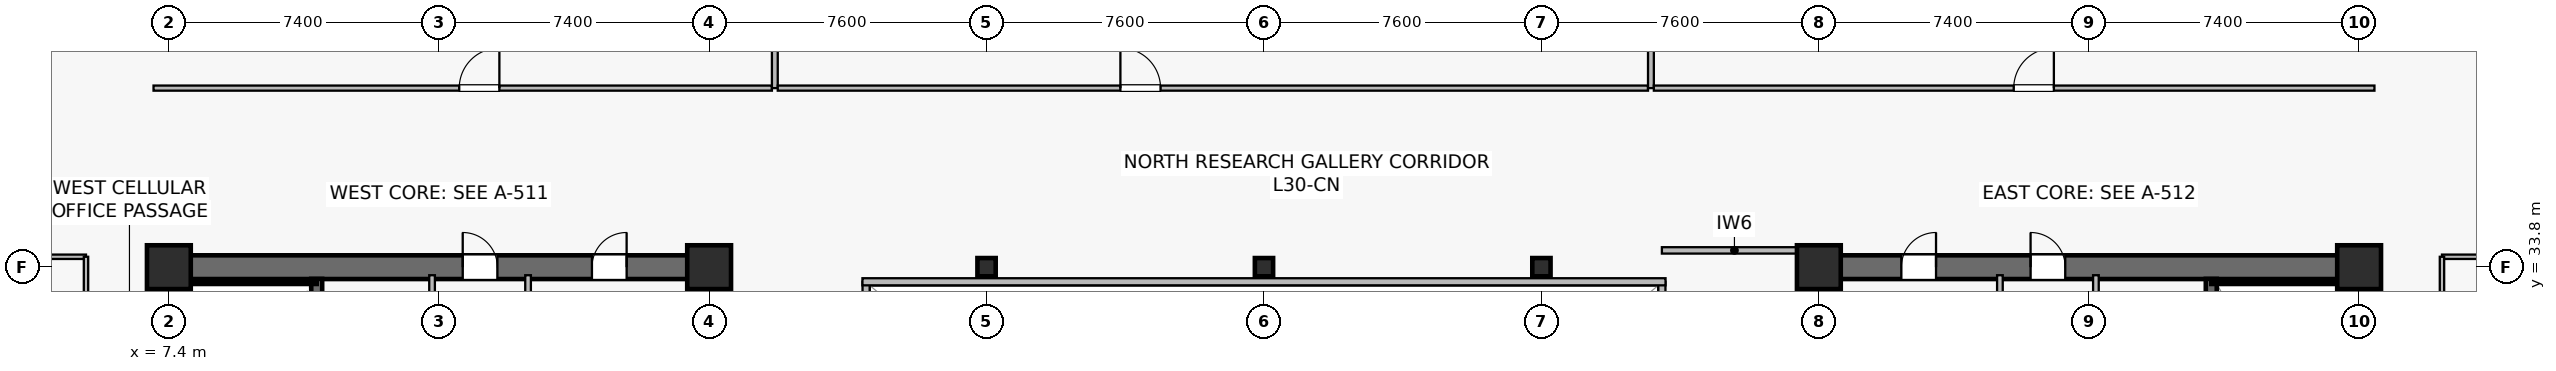
"""IFC4 building model, lengths in metres.
Left out: names, types, materials, properties, quantities, classifications, styles, units other than length and angle.
Written with IfcOpenShell. Run it as: python <this file> out.ifc"""

import sys

from ifc_helpers import new_model, si_unit, direction, frame, frame_2d, origin, origin_2d, place, context, subcontext, project, spatial, rectangle, hollow_rectangle, extrude, source, transform, mapped, element, fill, save


model = new_model("IFC4")
c1 = context("Model", 3, precision=1e-05, world=origin(), true_north=direction((0.0, 1.0)))
c2 = subcontext(c1, "Body", "Model", "MODEL_VIEW")
j1 = project(units=[si_unit("LENGTHUNIT", "METRE"), si_unit("PLANEANGLEUNIT", "RADIAN")], contexts=[c1])
p1 = place(None, origin())
s1 = spatial("IfcSite", under=j1, at=p1, CompositionType="ELEMENT")
p2 = place(p1, origin())
s2 = spatial("IfcBuilding", under=s1, at=p2, CompositionType="ELEMENT")
p3 = place(p2, frame((0.0, 0.0, 125.6)))
s3 = spatial("IfcBuildingStorey", under=s2, at=p3, CompositionType="ELEMENT", Elevation=125.6)
p4 = place(p3, frame((7.075, 33.8, 0.0), z_axis=(0.0, 0.0, 1.0), x_axis=(1.0, 0.0, 0.0)))
e1 = element("IfcWall", 1, at=p4, inside=s3, PredefinedType="SHEAR", context=c2, shape_type="SweptSolid", body=[
    extrude(rectangle(XDim=15.45, YDim=0.65, at=frame_2d((7.725, 0.0))), origin(), (0.0, 0.0, 1.0), 3.79),
])
p5 = place(p4, frame((8.375, 0.0, 0.0)))
e2 = element("IfcOpeningElement", 2, at=p5, cuts=e1, PredefinedType="OPENING", context=c2, shape_type="SweptSolid", body=[
    extrude(rectangle(XDim=0.95, YDim=2.15, at=frame_2d((0.475, 1.075))), frame((0.0, 0.335, 0.0), z_axis=(0.0, -1.0, 0.0), x_axis=(1.0, 0.0, 0.0)), (0.0, 0.0, 1.0), 0.67),
])
p6 = place(p4, frame((11.915, 0.0, 0.0)))
e3 = element("IfcOpeningElement", 3, at=p6, cuts=e1, PredefinedType="OPENING", context=c2, shape_type="SweptSolid", body=[
    extrude(rectangle(XDim=0.95, YDim=2.15, at=frame_2d((0.475, 1.075))), frame((0.0, 0.335, 0.0), z_axis=(0.0, -1.0, 0.0), x_axis=(1.0, 0.0, 0.0)), (0.0, 0.0, 1.0), 0.67),
])
p7 = place(p3, frame((7.4, 15.125, 0.0), z_axis=(0.0, 0.0, 1.0), x_axis=(0.0, 1.0, 0.0)))
e4 = element("IfcWall", 4, at=p7, inside=s3, PredefinedType="SHEAR", context=c2, shape_type="SweptSolid", body=[
    extrude(rectangle(XDim=18.35, YDim=0.65, at=frame_2d((9.175, 0.0))), origin(), (0.0, 0.0, 1.0), 3.79),
])
p8 = place(p3, frame((22.2, 15.125, 0.0), z_axis=(0.0, 0.0, 1.0), x_axis=(0.0, 1.0, 0.0)))
e5 = element("IfcWall", 5, at=p8, inside=s3, PredefinedType="SHEAR", context=c2, shape_type="SweptSolid", body=[
    extrude(rectangle(XDim=18.35, YDim=0.65, at=frame_2d((9.175, 0.0))), origin(), (0.0, 0.0, 1.0), 3.79),
])
p9 = place(p8, frame((3.425, 0.0, 0.0)))
e6 = element("IfcOpeningElement", 6, at=p9, cuts=e5, PredefinedType="OPENING", context=c2, shape_type="SweptSolid", body=[
    extrude(rectangle(XDim=1.42, YDim=2.2, at=frame_2d((0.71, 1.1))), frame((0.0, 0.335, 0.0), z_axis=(0.0, -1.0, 0.0), x_axis=(1.0, 0.0, 0.0)), (0.0, 0.0, 1.0), 0.67),
])
p10 = place(p3, frame((11.45, 24.85, 0.0), z_axis=(0.0, 0.0, 1.0), x_axis=(0.0, 1.0, 0.0)))
e7 = element("IfcWall", 7, at=p10, inside=s3, PredefinedType="SHEAR", context=c2, shape_type="SweptSolid", body=[
    extrude(rectangle(XDim=8.63, YDim=0.3, at=frame_2d((4.315, 0.0))), origin(), (0.0, 0.0, 1.0), 3.79),
])
p11 = place(p10, frame((0.42, 0.0, 0.0)))
e8 = element("IfcOpeningElement", 8, at=p11, cuts=e7, PredefinedType="OPENING", context=c2, shape_type="SweptSolid", body=[
    extrude(rectangle(XDim=1.1, YDim=2.15, at=frame_2d((0.55, 1.075))), frame((0.0, 0.16, 0.0), z_axis=(0.0, -1.0, 0.0), x_axis=(1.0, 0.0, 0.0)), (0.0, 0.0, 1.0), 0.32),
])
p12 = place(p3, frame((7.73, 33.4, 0.0), z_axis=(0.0, 0.0, 1.0), x_axis=(1.0, 0.0, 0.0)))
e9 = element("IfcWall", 9, at=p12, inside=s3, PredefinedType="SOLIDWALL", context=c2, shape_type="SweptSolid", body=[
    extrude(rectangle(XDim=3.72, YDim=0.12, at=frame_2d((1.86, 0.0))), origin(), (0.0, 0.0, 1.0), 3.79),
])
p13 = place(p3, frame((7.73, 25.0, 0.0), z_axis=(0.0, 0.0, 1.0), x_axis=(0.0, 1.0, 0.0)))
e10 = element("IfcWall", 10, at=p13, inside=s3, PredefinedType="SOLIDWALL", context=c2, shape_type="SweptSolid", body=[
    extrude(rectangle(XDim=8.32, YDim=0.12, at=frame_2d((4.16, 0.0))), origin(), (0.0, 0.0, 1.0), 3.79),
])
p14 = place(p3, frame((52.275, 33.8, 0.0), z_axis=(0.0, 0.0, 1.0), x_axis=(1.0, 0.0, 0.0)))
e11 = element("IfcWall", 11, at=p14, inside=s3, PredefinedType="SHEAR", context=c2, shape_type="SweptSolid", body=[
    extrude(rectangle(XDim=15.45, YDim=0.65, at=frame_2d((7.725, 0.0))), origin(), (0.0, 0.0, 1.0), 3.79),
])
p15 = place(p14, frame((6.125, 0.0, 0.0)))
e12 = element("IfcOpeningElement", 12, at=p15, cuts=e11, PredefinedType="OPENING", context=c2, shape_type="SweptSolid", body=[
    extrude(rectangle(XDim=0.95, YDim=2.15, at=frame_2d((0.475, 1.075))), frame((0.0, 0.335, 0.0), z_axis=(0.0, -1.0, 0.0), x_axis=(1.0, 0.0, 0.0)), (0.0, 0.0, 1.0), 0.67),
])
p16 = place(p14, frame((2.585, 0.0, 0.0)))
e13 = element("IfcOpeningElement", 13, at=p16, cuts=e11, PredefinedType="OPENING", context=c2, shape_type="SweptSolid", body=[
    extrude(rectangle(XDim=0.95, YDim=2.15, at=frame_2d((0.475, 1.075))), frame((0.0, 0.335, 0.0), z_axis=(0.0, -1.0, 0.0), x_axis=(1.0, 0.0, 0.0)), (0.0, 0.0, 1.0), 0.67),
])
p17 = place(p3, frame((52.6, 15.125, 0.0), z_axis=(0.0, 0.0, 1.0), x_axis=(0.0, 1.0, 0.0)))
e14 = element("IfcWall", 14, at=p17, inside=s3, PredefinedType="SHEAR", context=c2, shape_type="SweptSolid", body=[
    extrude(rectangle(XDim=18.35, YDim=0.65, at=frame_2d((9.175, 0.0))), origin(), (0.0, 0.0, 1.0), 3.79),
])
p18 = place(p17, frame((3.425, 0.0, 0.0)))
e15 = element("IfcOpeningElement", 15, at=p18, cuts=e14, PredefinedType="OPENING", context=c2, shape_type="SweptSolid", body=[
    extrude(rectangle(XDim=1.42, YDim=2.2, at=frame_2d((0.71, 1.1))), frame((0.0, 0.335, 0.0), z_axis=(0.0, -1.0, 0.0), x_axis=(1.0, 0.0, 0.0)), (0.0, 0.0, 1.0), 0.67),
])
p19 = place(p3, frame((67.4, 15.125, 0.0), z_axis=(0.0, 0.0, 1.0), x_axis=(0.0, 1.0, 0.0)))
e16 = element("IfcWall", 16, at=p19, inside=s3, PredefinedType="SHEAR", context=c2, shape_type="SweptSolid", body=[
    extrude(rectangle(XDim=18.35, YDim=0.65, at=frame_2d((9.175, 0.0))), origin(), (0.0, 0.0, 1.0), 3.79),
])
p20 = place(p3, frame((63.35, 24.85, 0.0), z_axis=(0.0, 0.0, 1.0), x_axis=(0.0, 1.0, 0.0)))
e17 = element("IfcWall", 17, at=p20, inside=s3, PredefinedType="SHEAR", context=c2, shape_type="SweptSolid", body=[
    extrude(rectangle(XDim=8.63, YDim=0.3, at=frame_2d((4.315, 0.0))), origin(), (0.0, 0.0, 1.0), 3.79),
])
p21 = place(p20, frame((0.42, 0.0, 0.0)))
e18 = element("IfcOpeningElement", 18, at=p21, cuts=e17, PredefinedType="OPENING", context=c2, shape_type="SweptSolid", body=[
    extrude(rectangle(XDim=1.1, YDim=2.15, at=frame_2d((0.55, 1.075))), frame((0.0, 0.16, 0.0), z_axis=(0.0, -1.0, 0.0), x_axis=(1.0, 0.0, 0.0)), (0.0, 0.0, 1.0), 0.32),
])
p22 = place(p3, frame((63.35, 33.4, 0.0), z_axis=(0.0, 0.0, 1.0), x_axis=(1.0, 0.0, 0.0)))
e19 = element("IfcWall", 19, at=p22, inside=s3, PredefinedType="SOLIDWALL", context=c2, shape_type="SweptSolid", body=[
    extrude(rectangle(XDim=3.72, YDim=0.12, at=frame_2d((1.86, 0.0))), origin(), (0.0, 0.0, 1.0), 3.79),
])
p23 = place(p3, frame((67.07, 25.0, 0.0), z_axis=(0.0, 0.0, 1.0), x_axis=(0.0, 1.0, 0.0)))
e20 = element("IfcWall", 20, at=p23, inside=s3, PredefinedType="SOLIDWALL", context=c2, shape_type="SweptSolid", body=[
    extrude(rectangle(XDim=8.32, YDim=0.12, at=frame_2d((4.16, 0.0))), origin(), (0.0, 0.0, 1.0), 3.79),
])
m1 = source(origin(), c2, "Body", "SweptSolid", [
    extrude(rectangle(XDim=1.2, YDim=1.2, at=origin_2d()), origin(), (0.0, 0.0, 1.0), 4.1),
])
for number, where, z_axis, x_axis in (
    (21, (7.4, 33.8, 0.0), (0.0, 0.0, 1.0), (1.0, 0.0, 0.0)),
    (22, (22.2, 33.8, 0.0), (0.0, 0.0, 1.0), (1.0, 0.0, 0.0)),
    (23, (52.6, 33.8, 0.0), (0.0, 0.0, 1.0), (1.0, 0.0, 0.0)),
    (24, (67.4, 33.8, 0.0), (0.0, 0.0, 1.0), (1.0, 0.0, 0.0)),
):
    element("IfcColumn", number, at=place(p3, frame(where, z_axis=z_axis, x_axis=x_axis)), inside=s3, PredefinedType="COLUMN", context=c2, shape_type="MappedRepresentation", body=[
        mapped(m1, transform((0.0, 0.0, 0.0), scale=1.0)),
    ])
m2 = source(origin(), c2, "Body", "SweptSolid", [
    extrude(hollow_rectangle(XDim=0.5, YDim=0.5, WallThickness=0.022, at=origin_2d()), origin(), (0.0, 0.0, 1.0), 4.1),
])
for number, where, z_axis, x_axis in (
    (25, (29.8, 33.8, 0.0), (0.0, 0.0, 1.0), (1.0, 0.0, 0.0)),
    (26, (37.4, 33.8, 0.0), (0.0, 0.0, 1.0), (1.0, 0.0, 0.0)),
    (27, (45.0, 33.8, 0.0), (0.0, 0.0, 1.0), (1.0, 0.0, 0.0)),
):
    element("IfcColumn", number, at=place(p3, frame(where, z_axis=z_axis, x_axis=x_axis)), inside=s3, PredefinedType="COLUMN", context=c2, shape_type="MappedRepresentation", body=[
        mapped(m2, transform((0.0, 0.0, 0.0), scale=1.0)),
    ])
p24 = place(p3, frame((14.61, 29.65, 0.0), z_axis=(0.0, 0.0, 1.0), x_axis=(0.0, 1.0, 0.0)))
e28 = element("IfcWall", 28, at=p24, inside=s3, PredefinedType="PLUMBINGWALL", context=c2, shape_type="SweptSolid", body=[
    extrude(rectangle(XDim=3.93, YDim=0.155, at=frame_2d((1.965, 0.0))), origin(), (0.0, 0.0, 1.0), 3.125),
])
p25 = place(p3, frame((17.24, 29.65, 0.0), z_axis=(0.0, 0.0, 1.0), x_axis=(0.0, 1.0, 0.0)))
e29 = element("IfcWall", 29, at=p25, inside=s3, PredefinedType="PLUMBINGWALL", context=c2, shape_type="SweptSolid", body=[
    extrude(rectangle(XDim=3.93, YDim=0.155, at=frame_2d((1.965, 0.0))), origin(), (0.0, 0.0, 1.0), 3.79),
])
p26 = place(p3, frame((60.19, 29.65, 0.0), z_axis=(0.0, 0.0, 1.0), x_axis=(0.0, 1.0, 0.0)))
e30 = element("IfcWall", 30, at=p26, inside=s3, PredefinedType="PLUMBINGWALL", context=c2, shape_type="SweptSolid", body=[
    extrude(rectangle(XDim=3.93, YDim=0.155, at=frame_2d((1.965, 0.0))), origin(), (0.0, 0.0, 1.0), 3.125),
])
p27 = place(p3, frame((57.56, 29.65, 0.0), z_axis=(0.0, 0.0, 1.0), x_axis=(0.0, 1.0, 0.0)))
e31 = element("IfcWall", 31, at=p27, inside=s3, PredefinedType="PLUMBINGWALL", context=c2, shape_type="SweptSolid", body=[
    extrude(rectangle(XDim=3.93, YDim=0.155, at=frame_2d((1.965, 0.0))), origin(), (0.0, 0.0, 1.0), 3.79),
])
p28 = place(p3, frame((48.3, 34.26, 0.0), z_axis=(0.0, 0.0, 1.0), x_axis=(1.0, 0.0, 0.0)))
e32 = element("IfcWall", 32, at=p28, inside=s3, PredefinedType="PARTITIONING", context=c2, shape_type="SweptSolid", body=[
    extrude(rectangle(XDim=3.975, YDim=0.175, at=frame_2d((1.987, 0.0))), origin(), (0.0, 0.0, 1.0), 3.475),
])
p29 = place(p3, frame((26.5, 15.2, 0.0), z_axis=(0.0, 0.0, 1.0), x_axis=(0.0, 1.0, 0.0)))
e33 = element("IfcWall", 33, at=p29, inside=s3, PredefinedType="SOLIDWALL", context=c2, shape_type="SweptSolid", body=[
    extrude(rectangle(XDim=18.2, YDim=0.195, at=frame_2d((9.1, 0.0))), origin(), (0.0, 0.0, 1.0), 3.79),
])
p30 = place(p29, frame((1.8, 0.0, 0.9)))
e34 = element("IfcOpeningElement", 34, at=p30, cuts=e33, PredefinedType="OPENING", context=c2, shape_type="SweptSolid", body=[
    extrude(rectangle(XDim=1.5, YDim=1.4, at=frame_2d((0.75, 0.7))), frame((0.0, 0.107, 0.0), z_axis=(0.0, -1.0, 0.0), x_axis=(1.0, 0.0, 0.0)), (0.0, 0.0, 1.0), 0.215),
])
p31 = place(p29, frame((13.2, 0.0, 0.9)))
e35 = element("IfcOpeningElement", 35, at=p31, cuts=e33, PredefinedType="OPENING", context=c2, shape_type="SweptSolid", body=[
    extrude(rectangle(XDim=1.5, YDim=1.4, at=frame_2d((0.75, 0.7))), frame((0.0, 0.107, 0.0), z_axis=(0.0, -1.0, 0.0), x_axis=(1.0, 0.0, 0.0)), (0.0, 0.0, 1.0), 0.215),
])
p32 = place(p3, frame((48.3, 15.2, 0.0), z_axis=(0.0, 0.0, 1.0), x_axis=(0.0, 1.0, 0.0)))
e36 = element("IfcWall", 36, at=p32, inside=s3, PredefinedType="SOLIDWALL", context=c2, shape_type="SweptSolid", body=[
    extrude(rectangle(XDim=18.2, YDim=0.195, at=frame_2d((9.1, 0.0))), origin(), (0.0, 0.0, 1.0), 3.79),
])
p33 = place(p32, frame((1.8, 0.0, 0.9)))
e37 = element("IfcOpeningElement", 37, at=p33, cuts=e36, PredefinedType="OPENING", context=c2, shape_type="SweptSolid", body=[
    extrude(rectangle(XDim=1.5, YDim=1.4, at=frame_2d((0.75, 0.7))), frame((0.0, 0.107, 0.0), z_axis=(0.0, -1.0, 0.0), x_axis=(1.0, 0.0, 0.0)), (0.0, 0.0, 1.0), 0.215),
])
p34 = place(p32, frame((13.2, 0.0, 0.9)))
e38 = element("IfcOpeningElement", 38, at=p34, cuts=e36, PredefinedType="OPENING", context=c2, shape_type="SweptSolid", body=[
    extrude(rectangle(XDim=1.5, YDim=1.4, at=frame_2d((0.75, 0.7))), frame((0.0, 0.107, 0.0), z_axis=(0.0, -1.0, 0.0), x_axis=(1.0, 0.0, 0.0)), (0.0, 0.0, 1.0), 0.215),
])
p35 = place(p3, frame((26.4, 33.4, 0.0), z_axis=(0.0, 0.0, 1.0), x_axis=(1.0, 0.0, 0.0)))
e39 = element("IfcWall", 39, at=p35, inside=s3, PredefinedType="SOLIDWALL", context=c2, shape_type="SweptSolid", body=[
    extrude(rectangle(XDim=22.0, YDim=0.195, at=frame_2d((11.0, 0.0))), origin(), (0.0, 0.0, 1.0), 3.79),
])
p36 = place(p3, frame((6.98, 38.705, 0.0), z_axis=(0.0, 0.0, 1.0), x_axis=(1.0, 0.0, 0.0)))
e40 = element("IfcWall", 40, at=p36, inside=s3, PredefinedType="PARTITIONING", context=c2, shape_type="SweptSolid", body=[
    extrude(rectangle(XDim=16.94, YDim=0.14, at=frame_2d((8.47, 0.0))), origin(), (0.0, 0.0, 1.0), 3.125),
])
p37 = place(p36, frame((8.374, 0.0, 0.0)))
e41 = element("IfcOpeningElement", 41, at=p37, cuts=e40, PredefinedType="OPENING", context=c2, shape_type="SweptSolid", body=[
    extrude(rectangle(XDim=1.1, YDim=2.18, at=frame_2d((0.55, 1.09))), frame((0.0, 0.08, 0.0), z_axis=(0.0, -1.0, 0.0), x_axis=(1.0, 0.0, 0.0)), (0.0, 0.0, 1.0), 0.16),
])
p38 = place(p3, frame((24.0, 38.705, 0.0), z_axis=(0.0, 0.0, 1.0), x_axis=(0.0, 1.0, 0.0)))
e42 = element("IfcWall", 42, at=p38, inside=s3, PredefinedType="PARTITIONING", context=c2, shape_type="SweptSolid", body=[
    extrude(rectangle(XDim=8.485, YDim=0.16, at=frame_2d((4.242, 0.0))), origin(), (0.0, 0.0, 1.0), 3.075),
])
p39 = place(p3, frame((24.08, 38.705, 0.0), z_axis=(0.0, 0.0, 1.0), x_axis=(1.0, 0.0, 0.0)))
e43 = element("IfcWall", 43, at=p39, inside=s3, PredefinedType="PARTITIONING", context=c2, shape_type="SweptSolid", body=[
    extrude(rectangle(XDim=23.84, YDim=0.14, at=frame_2d((11.92, 0.0))), origin(), (0.0, 0.0, 1.0), 3.125),
])
p40 = place(p39, frame((9.386, 0.0, 0.0)))
e44 = element("IfcOpeningElement", 44, at=p40, cuts=e43, PredefinedType="OPENING", context=c2, shape_type="SweptSolid", body=[
    extrude(rectangle(XDim=1.1, YDim=2.18, at=frame_2d((0.55, 1.09))), frame((0.0, 0.08, 0.0), z_axis=(0.0, -1.0, 0.0), x_axis=(1.0, 0.0, 0.0)), (0.0, 0.0, 1.0), 0.16),
])
p41 = place(p3, frame((48.0, 38.705, 0.0), z_axis=(0.0, 0.0, 1.0), x_axis=(0.0, 1.0, 0.0)))
e45 = element("IfcWall", 45, at=p41, inside=s3, PredefinedType="PARTITIONING", context=c2, shape_type="SweptSolid", body=[
    extrude(rectangle(XDim=7.285, YDim=0.16, at=frame_2d((3.643, 0.0))), origin(), (0.0, 0.0, 1.0), 3.075),
])
p42 = place(p3, frame((48.08, 38.705, 0.0), z_axis=(0.0, 0.0, 1.0), x_axis=(1.0, 0.0, 0.0)))
e46 = element("IfcWall", 46, at=p42, inside=s3, PredefinedType="PARTITIONING", context=c2, shape_type="SweptSolid", body=[
    extrude(rectangle(XDim=19.74, YDim=0.14, at=frame_2d((9.87, 0.0))), origin(), (0.0, 0.0, 1.0), 3.125),
])
p43 = place(p42, frame((9.858, 0.0, 0.0)))
e47 = element("IfcOpeningElement", 47, at=p43, cuts=e46, PredefinedType="OPENING", context=c2, shape_type="SweptSolid", body=[
    extrude(rectangle(XDim=1.1, YDim=2.18, at=frame_2d((0.55, 1.09))), frame((0.0, 0.08, 0.0), z_axis=(0.0, -1.0, 0.0), x_axis=(1.0, 0.0, 0.0)), (0.0, 0.0, 1.0), 0.16),
])
p44 = place(p3, frame((2.11, 34.085, 0.0), z_axis=(0.0, 0.0, 1.0), x_axis=(1.0, 0.0, 0.0)))
e48 = element("IfcWall", 48, at=p44, inside=s3, PredefinedType="PARTITIONING", context=c2, shape_type="SweptSolid", body=[
    extrude(rectangle(XDim=3.02, YDim=0.12, at=frame_2d((1.51, 0.0))), origin(), (0.0, 0.0, 1.0), 3.79),
])
p45 = place(p3, frame((5.13, 22.06, 0.0), z_axis=(0.0, 0.0, 1.0), x_axis=(0.0, 1.0, 0.0)))
e49 = element("IfcWall", 49, at=p45, inside=s3, PredefinedType="PARTITIONING", context=c2, shape_type="SweptSolid", body=[
    extrude(rectangle(XDim=12.025, YDim=0.12, at=frame_2d((6.012, 0.0))), origin(), (0.0, 0.0, 1.0), 3.79),
])
p46 = place(p45, frame((5.562, 0.0, 0.0)))
e50 = element("IfcOpeningElement", 50, at=p46, cuts=e49, PredefinedType="OPENING", context=c2, shape_type="SweptSolid", body=[
    extrude(rectangle(XDim=0.9, YDim=2.1, at=frame_2d((0.45, 1.05))), frame((0.0, 0.07, 0.0), z_axis=(0.0, -1.0, 0.0), x_axis=(1.0, 0.0, 0.0)), (0.0, 0.0, 1.0), 0.14),
])
p47 = place(p3, frame((69.67, 34.085, 0.0), z_axis=(0.0, 0.0, 1.0), x_axis=(1.0, 0.0, 0.0)))
e51 = element("IfcWall", 51, at=p47, inside=s3, PredefinedType="PARTITIONING", context=c2, shape_type="SweptSolid", body=[
    extrude(rectangle(XDim=3.02, YDim=0.12, at=frame_2d((1.51, 0.0))), origin(), (0.0, 0.0, 1.0), 3.79),
])
p48 = place(p3, frame((69.67, 14.515, 0.0), z_axis=(0.0, 0.0, 1.0), x_axis=(0.0, 1.0, 0.0)))
e52 = element("IfcWall", 52, at=p48, inside=s3, PredefinedType="PARTITIONING", context=c2, shape_type="SweptSolid", body=[
    extrude(rectangle(XDim=19.57, YDim=0.12, at=frame_2d((9.785, 0.0))), origin(), (0.0, 0.0, 1.0), 3.79),
])
p49 = place(p48, frame((9.335, 0.0, 0.0)))
e53 = element("IfcOpeningElement", 53, at=p49, cuts=e52, PredefinedType="OPENING", context=c2, shape_type="SweptSolid", body=[
    extrude(rectangle(XDim=0.9, YDim=2.1, at=frame_2d((0.45, 1.05))), frame((0.0, 0.07, 0.0), z_axis=(0.0, -1.0, 0.0), x_axis=(1.0, 0.0, 0.0)), (0.0, 0.0, 1.0), 0.14),
])
m3 = source(origin(), c2, "Body", "SweptSolid", [
    extrude(rectangle(XDim=0.95, YDim=2.15, at=frame_2d((0.475, 1.075))), frame((0.0, 0.025, 0.0), z_axis=(0.0, -1.0, 0.0), x_axis=(1.0, 0.0, 0.0)), (0.0, 0.0, 1.0), 0.05),
])
p50 = place(p5, origin())
e54 = element("IfcDoor", 54, at=p50, inside=s3, OperationType="SINGLE_SWING_LEFT", PredefinedType="DOOR", context=c2, shape_type="MappedRepresentation", body=[
    mapped(m3, transform((0.0, 0.0, 0.0), scale=1.0)),
])
fill(e2, e54)
p51 = place(p6, origin())
e55 = element("IfcDoor", 55, at=p51, inside=s3, OperationType="SINGLE_SWING_RIGHT", PredefinedType="DOOR", context=c2, shape_type="MappedRepresentation", body=[
    mapped(m3, transform((0.0, 0.0, 0.0), scale=1.0)),
])
fill(e3, e55)
p52 = place(p15, origin())
e56 = element("IfcDoor", 56, at=p52, inside=s3, OperationType="SINGLE_SWING_LEFT", PredefinedType="DOOR", context=c2, shape_type="MappedRepresentation", body=[
    mapped(m3, transform((0.0, 0.0, 0.0), scale=1.0)),
])
fill(e12, e56)
p53 = place(p16, origin())
e57 = element("IfcDoor", 57, at=p53, inside=s3, OperationType="SINGLE_SWING_RIGHT", PredefinedType="DOOR", context=c2, shape_type="MappedRepresentation", body=[
    mapped(m3, transform((0.0, 0.0, 0.0), scale=1.0)),
])
fill(e13, e57)
m4 = source(origin(), c2, "Body", "SweptSolid", [
    extrude(rectangle(XDim=1.1, YDim=2.18, at=frame_2d((0.55, 1.09))), frame((0.0, 0.025, 0.0), z_axis=(0.0, -1.0, 0.0), x_axis=(1.0, 0.0, 0.0)), (0.0, 0.0, 1.0), 0.05),
])
p54 = place(p37, origin())
e58 = element("IfcDoor", 58, at=p54, inside=s3, OperationType="SINGLE_SWING_RIGHT", PredefinedType="DOOR", context=c2, shape_type="MappedRepresentation", body=[
    mapped(m4, transform((0.0, 0.0, 0.0), scale=1.0)),
])
fill(e41, e58)
p55 = place(p40, origin())
e59 = element("IfcDoor", 59, at=p55, inside=s3, OperationType="SINGLE_SWING_LEFT", PredefinedType="DOOR", context=c2, shape_type="MappedRepresentation", body=[
    mapped(m4, transform((0.0, 0.0, 0.0), scale=1.0)),
])
fill(e44, e59)
p56 = place(p43, origin())
e60 = element("IfcDoor", 60, at=p56, inside=s3, OperationType="SINGLE_SWING_RIGHT", PredefinedType="DOOR", context=c2, shape_type="MappedRepresentation", body=[
    mapped(m4, transform((0.0, 0.0, 0.0), scale=1.0)),
])
fill(e47, e60)
save(model, sys.argv[1])
